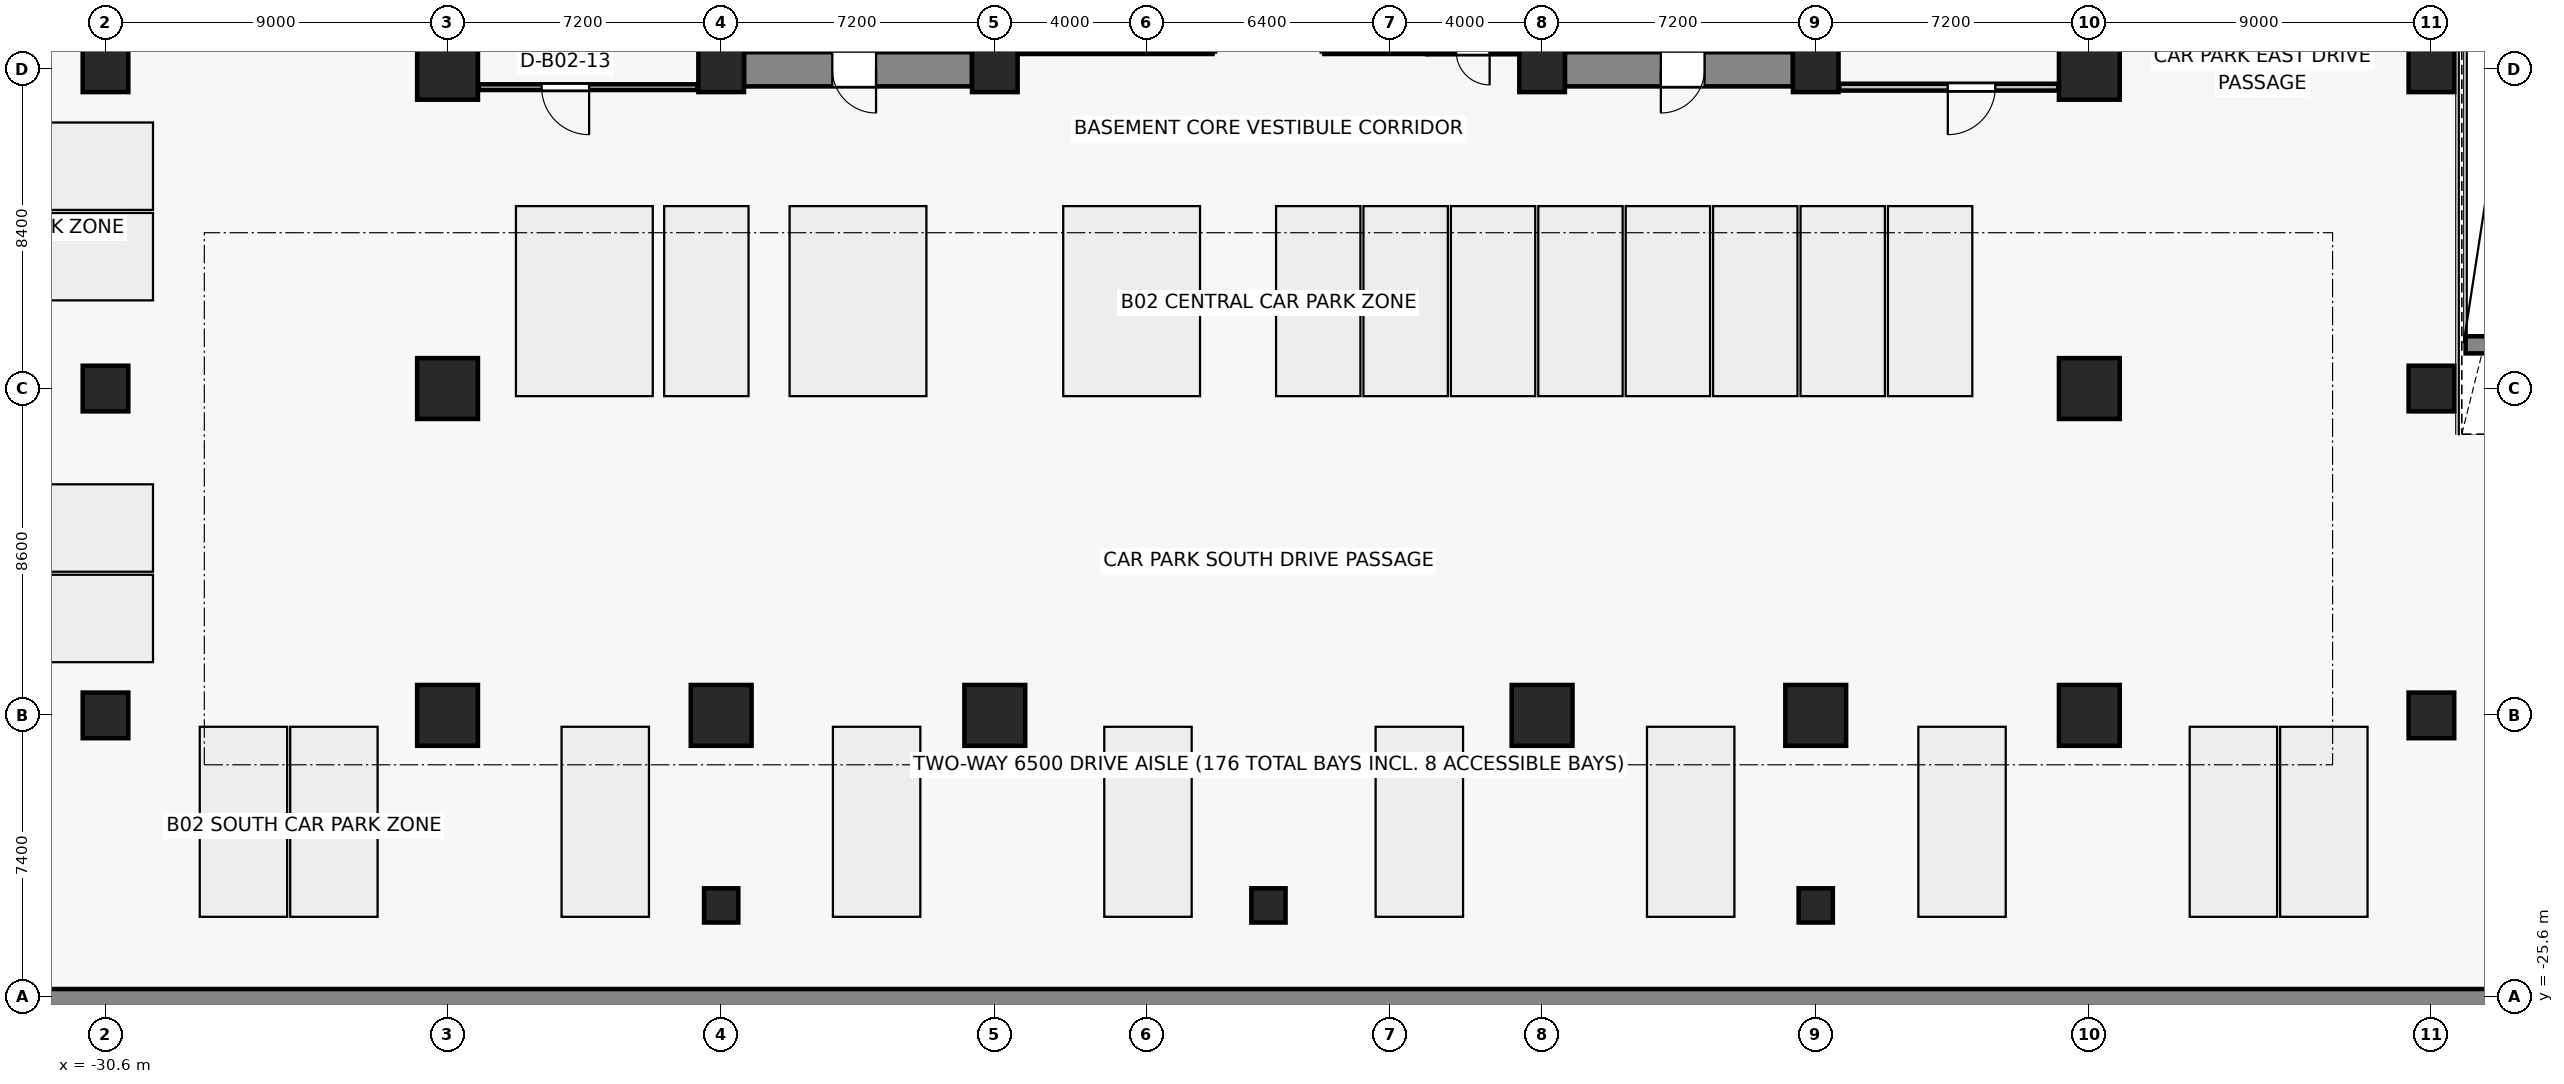
"""IFC4 building model, lengths in metres.
Left out: names, types, materials, properties, quantities, classifications, styles, units other than length and angle.
Written with IfcOpenShell. Run it as: python <this file> out.ifc"""

import sys

from ifc_helpers import new_model, si_unit, direction, frame, frame_2d, origin, origin_2d, place, context, subcontext, project, spatial, rectangle, extrude, source, transform, mapped, element, fill, save


model = new_model("IFC4")
c1 = context("Model", 3, precision=1e-05, world=origin(), true_north=direction((0.0, 1.0)))
c2 = subcontext(c1, "Body", "Model", "MODEL_VIEW")
j1 = project(units=[si_unit("LENGTHUNIT", "METRE"), si_unit("PLANEANGLEUNIT", "RADIAN")], contexts=[c1])
p1 = place(None, origin())
s1 = spatial("IfcSite", under=j1, at=p1, CompositionType="ELEMENT")
p2 = place(p1, origin())
s2 = spatial("IfcBuilding", under=s1, at=p2, CompositionType="ELEMENT")
p3 = place(p2, frame((0.0, 0.0, -8.8)))
s3 = spatial("IfcBuildingStorey", under=s2, at=p3, CompositionType="ELEMENT", Elevation=-8.8)
p4 = place(p3, frame((37.0, -25.8, 0.0), z_axis=(0.0, 0.0, 1.0), x_axis=(-1.0, 0.0, 0.0)))
e1 = element("IfcWall", 1, at=p4, inside=s3, PredefinedType="USERDEFINED", context=c2, shape_type="SweptSolid", body=[
    extrude(rectangle(XDim=74.0, YDim=0.8, at=frame_2d((37.0, 0.0))), origin(), (0.0, 0.0, 1.0), 4.12),
])
for number, where, z_axis, x_axis in (
    (2, (-14.4, -1.2, 0.0), (0.0, 0.0, 1.0), (1.0, 0.0, 0.0)),
    (3, (-7.2, -1.2, 0.0), (0.0, 0.0, 1.0), (1.0, 0.0, 0.0)),
    (4, (7.2, -1.2, 0.0), (0.0, 0.0, 1.0), (1.0, 0.0, 0.0)),
    (5, (14.4, -1.2, 0.0), (0.0, 0.0, 1.0), (1.0, 0.0, 0.0)),
):
    element("IfcColumn", number, at=place(p3, frame(where, z_axis=z_axis, x_axis=x_axis)), inside=s3, PredefinedType="COLUMN", context=c2, shape_type="SweptSolid", body=[
        extrude(rectangle(XDim=1.2, YDim=1.2, at=origin_2d()), origin(), (0.0, 0.0, 1.0), 4.4),
    ])
for number, where, z_axis, x_axis in (
    (6, (-21.6, -18.2, 0.0), (0.0, 0.0, 1.0), (1.0, 0.0, 0.0)),
    (7, (-14.4, -18.2, 0.0), (0.0, 0.0, 1.0), (1.0, 0.0, 0.0)),
    (8, (-7.2, -18.2, 0.0), (0.0, 0.0, 1.0), (1.0, 0.0, 0.0)),
    (9, (7.2, -18.2, 0.0), (0.0, 0.0, 1.0), (1.0, 0.0, 0.0)),
    (10, (14.4, -18.2, 0.0), (0.0, 0.0, 1.0), (1.0, 0.0, 0.0)),
    (11, (21.6, -18.2, 0.0), (0.0, 0.0, 1.0), (1.0, 0.0, 0.0)),
    (12, (-21.6, -9.6, 0.0), (0.0, 0.0, 1.0), (1.0, 0.0, 0.0)),
    (13, (21.6, -9.6, 0.0), (0.0, 0.0, 1.0), (1.0, 0.0, 0.0)),
    (14, (-21.6, -1.2, 0.0), (0.0, 0.0, 1.0), (1.0, 0.0, 0.0)),
    (15, (21.6, -1.2, 0.0), (0.0, 0.0, 1.0), (1.0, 0.0, 0.0)),
):
    element("IfcColumn", number, at=place(p3, frame(where, z_axis=z_axis, x_axis=x_axis)), inside=s3, PredefinedType="COLUMN", context=c2, shape_type="SweptSolid", body=[
        extrude(rectangle(XDim=1.6, YDim=1.6, at=origin_2d()), origin(), (0.0, 0.0, 1.0), 4.4),
    ])
for number, where, z_axis, x_axis in (
    (16, (-30.6, -18.2, 0.0), (0.0, 0.0, 1.0), (1.0, 0.0, 0.0)),
    (17, (-30.6, -9.6, 0.0), (0.0, 0.0, 1.0), (1.0, 0.0, 0.0)),
    (18, (-30.6, -1.2, 0.0), (0.0, 0.0, 1.0), (1.0, 0.0, 0.0)),
    (19, (30.6, -18.2, 0.0), (0.0, 0.0, 1.0), (1.0, 0.0, 0.0)),
    (20, (30.6, -9.6, 0.0), (0.0, 0.0, 1.0), (1.0, 0.0, 0.0)),
    (21, (30.6, -1.2, 0.0), (0.0, 0.0, 1.0), (1.0, 0.0, 0.0)),
):
    element("IfcColumn", number, at=place(p3, frame(where, z_axis=z_axis, x_axis=x_axis)), inside=s3, PredefinedType="COLUMN", context=c2, shape_type="SweptSolid", body=[
        extrude(rectangle(XDim=1.2, YDim=1.2, at=origin_2d()), origin(), (0.0, 0.0, 1.0), 4.4),
    ])
for number, where, z_axis, x_axis in (
    (22, (-14.4, -23.2, 0.0), (0.0, 0.0, 1.0), (1.0, 0.0, 0.0)),
    (23, (0.0, -23.2, 0.0), (0.0, 0.0, 1.0), (1.0, 0.0, 0.0)),
    (24, (14.4, -23.2, 0.0), (0.0, 0.0, 1.0), (1.0, 0.0, 0.0)),
):
    element("IfcColumn", number, at=place(p3, frame(where, z_axis=z_axis, x_axis=x_axis)), inside=s3, PredefinedType="COLUMN", context=c2, shape_type="SweptSolid", body=[
        extrude(rectangle(XDim=0.9, YDim=0.9, at=origin_2d()), origin(), (0.0, 0.0, 1.0), 4.4),
    ])
p5 = place(p3, frame((-7.8, -1.2, 0.0), z_axis=(0.0, 0.0, 1.0), x_axis=(-1.0, 0.0, 0.0)))
e25 = element("IfcWall", 25, at=p5, inside=s3, PredefinedType="SHEAR", context=c2, shape_type="SweptSolid", body=[
    extrude(rectangle(XDim=6.0, YDim=0.9, at=frame_2d((3.0, 0.0))), origin(), (0.0, 0.0, 1.0), 4.12),
])
p6 = place(p5, frame((2.525, 0.0, 0.0)))
e26 = element("IfcOpeningElement", 26, at=p6, cuts=e25, PredefinedType="OPENING", context=c2, shape_type="SweptSolid", body=[
    extrude(rectangle(XDim=1.15, YDim=2.15, at=frame_2d((0.575, 1.075))), frame((0.0, 0.46, 0.0), z_axis=(0.0, -1.0, 0.0), x_axis=(1.0, 0.0, 0.0)), (0.0, 0.0, 1.0), 0.92),
])
p7 = place(p3, frame((13.8, -1.2, 0.0), z_axis=(0.0, 0.0, 1.0), x_axis=(-1.0, 0.0, 0.0)))
e27 = element("IfcWall", 27, at=p7, inside=s3, PredefinedType="SHEAR", context=c2, shape_type="SweptSolid", body=[
    extrude(rectangle(XDim=6.0, YDim=0.9, at=frame_2d((3.0, 0.0))), origin(), (0.0, 0.0, 1.0), 4.12),
])
p8 = place(p7, frame((2.325, 0.0, 0.0)))
e28 = element("IfcOpeningElement", 28, at=p8, cuts=e27, PredefinedType="OPENING", context=c2, shape_type="SweptSolid", body=[
    extrude(rectangle(XDim=1.15, YDim=2.15, at=frame_2d((0.575, 1.075))), frame((0.0, 0.46, 0.0), z_axis=(0.0, -1.0, 0.0), x_axis=(1.0, 0.0, 0.0)), (0.0, 0.0, 1.0), 0.92),
])
p9 = place(p3, frame((31.5, -8.45, 0.0), z_axis=(0.0, 0.0, 1.0), x_axis=(1.0, 0.0, 0.0)))
e29 = element("IfcWall", 29, at=p9, inside=s3, PredefinedType="SHEAR", context=c2, shape_type="SweptSolid", body=[
    extrude(rectangle(XDim=5.4, YDim=0.45, at=frame_2d((2.7, 0.0))), origin(), (0.0, 0.0, 1.0), 4.2),
])
p10 = place(p3, frame((-1.47, -0.73, 0.0), z_axis=(0.0, 0.0, 1.0), x_axis=(-1.0, 0.0, 0.0)))
e30 = element("IfcWall", 30, at=p10, inside=s3, PredefinedType="PARTITIONING", context=c2, shape_type="SweptSolid", body=[
    extrude(rectangle(XDim=5.11, YDim=0.135, at=frame_2d((2.555, 0.0))), origin(), (0.0, 0.0, 1.0), 4.12),
])
p11 = place(p3, frame((4.18, -0.73, 0.0), z_axis=(0.0, 0.0, 1.0), x_axis=(-1.0, 0.0, 0.0)))
e31 = element("IfcWall", 31, at=p11, inside=s3, PredefinedType="PARTITIONING", context=c2, shape_type="SweptSolid", body=[
    extrude(rectangle(XDim=2.71, YDim=0.135, at=frame_2d((1.355, 0.0))), origin(), (0.0, 0.0, 1.0), 4.12),
])
p12 = place(p3, frame((6.58, -0.73, 0.0), z_axis=(0.0, 0.0, 1.0), x_axis=(-1.0, 0.0, 0.0)))
e32 = element("IfcWall", 32, at=p12, inside=s3, PredefinedType="PARTITIONING", context=c2, shape_type="SweptSolid", body=[
    extrude(rectangle(XDim=2.4, YDim=0.15, at=frame_2d((1.2, 0.0))), origin(), (0.0, 0.0, 1.0), 4.12),
])
p13 = place(p12, frame((0.76, 0.0, 0.0)))
e33 = element("IfcOpeningElement", 33, at=p13, cuts=e32, PredefinedType="OPENING", context=c2, shape_type="SweptSolid", body=[
    extrude(rectangle(XDim=0.88, YDim=2.1, at=frame_2d((0.44, 1.05))), frame((0.0, 0.085, 0.0), z_axis=(0.0, -1.0, 0.0), x_axis=(1.0, 0.0, 0.0)), (0.0, 0.0, 1.0), 0.17),
])
p14 = place(p3, frame((-15.02, -1.67, 0.0), z_axis=(0.0, 0.0, 1.0), x_axis=(-1.0, 0.0, 0.0)))
e34 = element("IfcWall", 34, at=p14, inside=s3, PredefinedType="PARTITIONING", context=c2, shape_type="SweptSolid", body=[
    extrude(rectangle(XDim=5.76, YDim=0.15, at=frame_2d((2.88, 0.0))), origin(), (0.0, 0.0, 1.0), 4.12),
])
p15 = place(p14, frame((2.855, 0.0, 0.0)))
e35 = element("IfcOpeningElement", 35, at=p15, cuts=e34, PredefinedType="OPENING", context=c2, shape_type="SweptSolid", body=[
    extrude(rectangle(XDim=1.25, YDim=2.15, at=frame_2d((0.625, 1.075))), frame((0.0, 0.085, 0.0), z_axis=(0.0, -1.0, 0.0), x_axis=(1.0, 0.0, 0.0)), (0.0, 0.0, 1.0), 0.17),
])
p16 = place(p3, frame((20.78, -1.67, 0.0), z_axis=(0.0, 0.0, 1.0), x_axis=(-1.0, 0.0, 0.0)))
e36 = element("IfcWall", 36, at=p16, inside=s3, PredefinedType="PARTITIONING", context=c2, shape_type="SweptSolid", body=[
    extrude(rectangle(XDim=5.76, YDim=0.18, at=frame_2d((2.88, 0.0))), origin(), (0.0, 0.0, 1.0), 4.12),
])
p17 = place(p16, frame((1.655, 0.0, 0.0)))
e37 = element("IfcOpeningElement", 37, at=p17, cuts=e36, PredefinedType="OPENING", context=c2, shape_type="SweptSolid", body=[
    extrude(rectangle(XDim=1.25, YDim=2.15, at=frame_2d((0.625, 1.075))), frame((0.0, 0.1, 0.0), z_axis=(0.0, -1.0, 0.0), x_axis=(1.0, 0.0, 0.0)), (0.0, 0.0, 1.0), 0.2),
])
m1 = source(origin(), c2, "Body", "SweptSolid", [
    extrude(rectangle(XDim=1.15, YDim=2.15, at=frame_2d((0.575, 1.075))), frame((0.0, 0.025, 0.0), z_axis=(0.0, -1.0, 0.0), x_axis=(1.0, 0.0, 0.0)), (0.0, 0.0, 1.0), 0.05),
])
p18 = place(p6, origin())
e38 = element("IfcDoor", 38, at=p18, inside=s3, OperationType="SINGLE_SWING_LEFT", PredefinedType="DOOR", context=c2, shape_type="MappedRepresentation", body=[
    mapped(m1, transform((0.0, 0.0, 0.0), x_axis=(1.0, 0.0, 0.0), y_axis=(0.0, 1.0, 0.0), z_axis=(0.0, 0.0, 1.0), scale=1.0)),
])
fill(e26, e38)
p19 = place(p8, origin())
e39 = element("IfcDoor", 39, at=p19, inside=s3, OperationType="SINGLE_SWING_RIGHT", PredefinedType="DOOR", context=c2, shape_type="MappedRepresentation", body=[
    mapped(m1, transform((0.0, 0.0, 0.0), x_axis=(1.0, 0.0, 0.0), y_axis=(0.0, 1.0, 0.0), z_axis=(0.0, 0.0, 1.0), scale=1.0)),
])
fill(e28, e39)
m2 = source(origin(), c2, "Body", "SweptSolid", [
    extrude(rectangle(XDim=0.88, YDim=2.1, at=frame_2d((0.44, 1.05))), frame((0.0, 0.025, 0.0), z_axis=(0.0, -1.0, 0.0), x_axis=(1.0, 0.0, 0.0)), (0.0, 0.0, 1.0), 0.05),
])
p20 = place(p13, origin())
e40 = element("IfcDoor", 40, at=p20, inside=s3, OperationType="SINGLE_SWING_LEFT", PredefinedType="DOOR", context=c2, shape_type="MappedRepresentation", body=[
    mapped(m2, transform((0.0, 0.0, 0.0), x_axis=(1.0, 0.0, 0.0), y_axis=(0.0, 1.0, 0.0), z_axis=(0.0, 0.0, 1.0), scale=1.0)),
])
fill(e33, e40)
m3 = source(origin(), c2, "Body", "SweptSolid", [
    extrude(rectangle(XDim=1.25, YDim=2.15, at=frame_2d((0.625, 1.075))), frame((0.0, 0.025, 0.0), z_axis=(0.0, -1.0, 0.0), x_axis=(1.0, 0.0, 0.0)), (0.0, 0.0, 1.0), 0.05),
])
p21 = place(p15, origin())
e41 = element("IfcDoor", 41, at=p21, inside=s3, OperationType="SINGLE_SWING_LEFT", PredefinedType="DOOR", context=c2, shape_type="MappedRepresentation", body=[
    mapped(m3, transform((0.0, 0.0, 0.0), x_axis=(1.0, 0.0, 0.0), y_axis=(0.0, 1.0, 0.0), z_axis=(0.0, 0.0, 1.0), scale=1.0)),
])
fill(e35, e41)
p22 = place(p17, origin())
e42 = element("IfcDoor", 42, at=p22, inside=s3, OperationType="SINGLE_SWING_RIGHT", PredefinedType="DOOR", context=c2, shape_type="MappedRepresentation", body=[
    mapped(m3, transform((0.0, 0.0, 0.0), x_axis=(1.0, 0.0, 0.0), y_axis=(0.0, 1.0, 0.0), z_axis=(0.0, 0.0, 1.0), scale=1.0)),
])
fill(e37, e42)
save(model, sys.argv[1])
